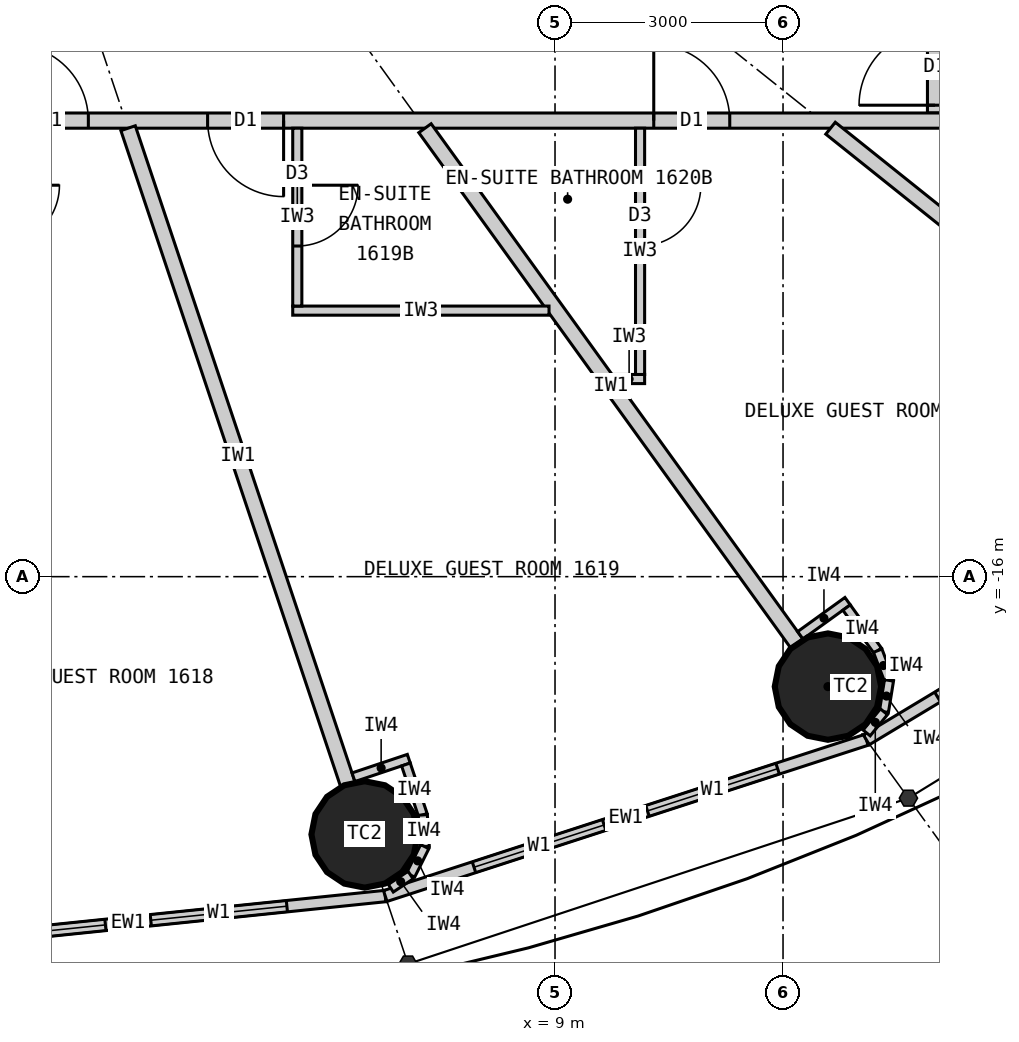
"""IFC4 building model, lengths in metres.
Left out: names, types, materials, properties, quantities, classifications, styles, units other than length and angle.
Written with IfcOpenShell. Run it as: python <this file> out.ifc"""

import sys

from ifc_helpers import new_model, si_unit, direction, frame, frame_2d, origin, origin_2d, place, context, subcontext, project, spatial, rectangle, circle, extrude, element, fill, save


model = new_model("IFC4")
c1 = context("Model", 3, precision=1e-05, world=origin(), true_north=direction((0.0, 1.0)))
c2 = subcontext(c1, "Body", "Model", "MODEL_VIEW")
j1 = project(units=[si_unit("LENGTHUNIT", "METRE"), si_unit("PLANEANGLEUNIT", "RADIAN")], contexts=[c1])
p1 = place(None, origin())
s1 = spatial("IfcSite", under=j1, at=p1, CompositionType="ELEMENT")
p2 = place(p1, origin())
s2 = spatial("IfcBuilding", under=s1, at=p2, CompositionType="ELEMENT")
p3 = place(p2, frame((0.0, 0.0, 67.2)))
s3 = spatial("IfcBuildingStorey", under=s2, at=p3, CompositionType="ELEMENT", Elevation=67.2)
for number, where, z_axis, x_axis in (
    (1, (6.495, -19.391, 0.0), (0.0, 0.0, 1.0), (1.0, 0.0, 0.0)),
    (2, (12.591, -17.447, 0.0), (0.0, 0.0, 1.0), (1.0, 0.0, 0.0)),
):
    element("IfcColumn", number, at=place(p3, frame(where, z_axis=z_axis, x_axis=x_axis)), inside=s3, PredefinedType="COLUMN", context=c2, shape_type="SweptSolid", body=[
        extrude(circle(Radius=0.7, at=origin_2d()), origin(), (0.0, 0.0, 1.0), 3.3),
    ])
p4 = place(p3, frame((0.0, -20.9, 0.0), z_axis=(0.0, 0.0, 1.0), x_axis=(0.994721394369, 0.102612609291, 0.0)))
e3 = element("IfcWall", 3, at=p4, inside=s3, PredefinedType="ELEMENTEDWALL", context=c2, shape_type="SweptSolid", body=[
    extrude(rectangle(XDim=6.802, YDim=0.15, at=frame_2d((3.401, 0.0))), origin(), (0.0, 0.0, 1.0), 3.12),
])
p5 = place(p4, frame((1.301, 0.0, 0.9)))
e4 = element("IfcOpeningElement", 4, at=p5, cuts=e3, PredefinedType="OPENING", context=c2, shape_type="SweptSolid", body=[
    extrude(rectangle(XDim=1.8, YDim=1.9, at=frame_2d((0.9, 0.95))), frame((0.0, 0.085, 0.0), z_axis=(0.0, -1.0, 0.0), x_axis=(1.0, 0.0, 0.0)), (0.0, 0.0, 1.0), 0.17),
])
p6 = place(p4, frame((3.701, 0.0, 0.9)))
e5 = element("IfcOpeningElement", 5, at=p6, cuts=e3, PredefinedType="OPENING", context=c2, shape_type="SweptSolid", body=[
    extrude(rectangle(XDim=1.8, YDim=1.9, at=frame_2d((0.9, 0.95))), frame((0.0, 0.085, 0.0), z_axis=(0.0, -1.0, 0.0), x_axis=(1.0, 0.0, 0.0)), (0.0, 0.0, 1.0), 0.17),
])
p7 = place(p3, frame((6.766, -20.202, 0.0), z_axis=(0.0, 0.0, 1.0), x_axis=(0.951137534625, 0.308767534285, 0.0)))
e6 = element("IfcWall", 6, at=p7, inside=s3, PredefinedType="ELEMENTEDWALL", context=c2, shape_type="SweptSolid", body=[
    extrude(rectangle(XDim=6.655, YDim=0.15, at=frame_2d((3.328, 0.0))), origin(), (0.0, 0.0, 1.0), 3.12),
])
p8 = place(p7, frame((1.228, 0.0, 0.9)))
e7 = element("IfcOpeningElement", 7, at=p8, cuts=e6, PredefinedType="OPENING", context=c2, shape_type="SweptSolid", body=[
    extrude(rectangle(XDim=1.8, YDim=1.9, at=frame_2d((0.9, 0.95))), frame((0.0, 0.085, 0.0), z_axis=(0.0, -1.0, 0.0), x_axis=(1.0, 0.0, 0.0)), (0.0, 0.0, 1.0), 0.17),
])
p9 = place(p7, frame((3.628, 0.0, 0.9)))
e8 = element("IfcOpeningElement", 8, at=p9, cuts=e6, PredefinedType="OPENING", context=c2, shape_type="SweptSolid", body=[
    extrude(rectangle(XDim=1.8, YDim=1.9, at=frame_2d((0.9, 0.95))), frame((0.0, 0.085, 0.0), z_axis=(0.0, -1.0, 0.0), x_axis=(1.0, 0.0, 0.0)), (0.0, 0.0, 1.0), 0.17),
])
p10 = place(p3, frame((13.096, -18.147, 0.0), z_axis=(0.0, 0.0, 1.0), x_axis=(0.856983180864, 0.515344377787, 0.0)))
e9 = element("IfcWall", 9, at=p10, inside=s3, PredefinedType="ELEMENTEDWALL", context=c2, shape_type="SweptSolid", body=[
    extrude(rectangle(XDim=6.386, YDim=0.15, at=frame_2d((3.193, 0.0))), origin(), (0.0, 0.0, 1.0), 3.12),
])
p11 = place(p10, frame((1.093, 0.0, 0.9)))
e10 = element("IfcOpeningElement", 10, at=p11, cuts=e9, PredefinedType="OPENING", context=c2, shape_type="SweptSolid", body=[
    extrude(rectangle(XDim=1.8, YDim=1.9, at=frame_2d((0.9, 0.95))), frame((0.0, 0.085, 0.0), z_axis=(0.0, -1.0, 0.0), x_axis=(1.0, 0.0, 0.0)), (0.0, 0.0, 1.0), 0.17),
])
p12 = place(p10, frame((3.493, 0.0, 0.9)))
e11 = element("IfcOpeningElement", 11, at=p12, cuts=e9, PredefinedType="OPENING", context=c2, shape_type="SweptSolid", body=[
    extrude(rectangle(XDim=1.8, YDim=1.9, at=frame_2d((0.9, 0.95))), frame((0.0, 0.085, 0.0), z_axis=(0.0, -1.0, 0.0), x_axis=(1.0, 0.0, 0.0)), (0.0, 0.0, 1.0), 0.17),
])
p13 = place(p3, frame((14.0, -9.9, 0.0), z_axis=(0.0, 0.0, 1.0), x_axis=(0.0, 1.0, 0.0)))
e12 = element("IfcWall", 12, at=p13, inside=s3, PredefinedType="PARTITIONING", context=c2, shape_type="SweptSolid", body=[
    extrude(rectangle(XDim=19.8, YDim=0.2, at=frame_2d((9.9, 0.0))), origin(), (0.0, 0.0, 1.0), 3.12),
])
p14 = place(p13, frame((0.103, 0.0, 0.0)))
e13 = element("IfcOpeningElement", 13, at=p14, cuts=e12, PredefinedType="OPENING", context=c2, shape_type="SweptSolid", body=[
    extrude(rectangle(XDim=1.0, YDim=2.2, at=frame_2d((0.5, 1.1))), frame((0.0, 0.11, 0.0), z_axis=(0.0, -1.0, 0.0), x_axis=(1.0, 0.0, 0.0)), (0.0, 0.0, 1.0), 0.22),
])
p15 = place(p13, frame((5.248, 0.0, 0.0)))
e14 = element("IfcOpeningElement", 14, at=p15, cuts=e12, PredefinedType="OPENING", context=c2, shape_type="SweptSolid", body=[
    extrude(rectangle(XDim=1.0, YDim=2.2, at=frame_2d((0.5, 1.1))), frame((0.0, 0.11, 0.0), z_axis=(0.0, -1.0, 0.0), x_axis=(1.0, 0.0, 0.0)), (0.0, 0.0, 1.0), 0.22),
])
p16 = place(p13, frame((8.438, 0.0, 0.0)))
e15 = element("IfcOpeningElement", 15, at=p16, cuts=e12, PredefinedType="OPENING", context=c2, shape_type="SweptSolid", body=[
    extrude(rectangle(XDim=1.0, YDim=2.2, at=frame_2d((0.5, 1.1))), frame((0.0, 0.11, 0.0), z_axis=(0.0, -1.0, 0.0), x_axis=(1.0, 0.0, 0.0)), (0.0, 0.0, 1.0), 0.22),
])
p17 = place(p13, frame((14.532, 0.0, 0.0)))
e16 = element("IfcOpeningElement", 16, at=p17, cuts=e12, PredefinedType="OPENING", context=c2, shape_type="SweptSolid", body=[
    extrude(rectangle(XDim=1.0, YDim=2.2, at=frame_2d((0.5, 1.1))), frame((0.0, 0.11, 0.0), z_axis=(0.0, -1.0, 0.0), x_axis=(1.0, 0.0, 0.0)), (0.0, 0.0, 1.0), 0.22),
])
p18 = place(p3, frame((14.1, -10.0, 0.0), z_axis=(0.0, 0.0, 1.0), x_axis=(-1.0, 0.0, 0.0)))
e17 = element("IfcWall", 17, at=p18, inside=s3, PredefinedType="PARTITIONING", context=c2, shape_type="SweptSolid", body=[
    extrude(rectangle(XDim=28.2, YDim=0.2, at=frame_2d((14.1, 0.0))), origin(), (0.0, 0.0, 1.0), 3.12),
])
p19 = place(p18, frame((23.865, 0.0, 0.0)))
e18 = element("IfcOpeningElement", 18, at=p19, cuts=e17, PredefinedType="OPENING", context=c2, shape_type="SweptSolid", body=[
    extrude(rectangle(XDim=1.0, YDim=2.2, at=frame_2d((0.5, 1.1))), frame((0.0, 0.11, 0.0), z_axis=(0.0, -1.0, 0.0), x_axis=(1.0, 0.0, 0.0)), (0.0, 0.0, 1.0), 0.22),
])
p20 = place(p18, frame((18.529, 0.0, 0.0)))
e19 = element("IfcOpeningElement", 19, at=p20, cuts=e17, PredefinedType="OPENING", context=c2, shape_type="SweptSolid", body=[
    extrude(rectangle(XDim=1.0, YDim=2.2, at=frame_2d((0.5, 1.1))), frame((0.0, 0.11, 0.0), z_axis=(0.0, -1.0, 0.0), x_axis=(1.0, 0.0, 0.0)), (0.0, 0.0, 1.0), 0.22),
])
p21 = place(p18, frame((14.623, 0.0, 0.0)))
e20 = element("IfcOpeningElement", 20, at=p21, cuts=e17, PredefinedType="OPENING", context=c2, shape_type="SweptSolid", body=[
    extrude(rectangle(XDim=1.0, YDim=2.2, at=frame_2d((0.5, 1.1))), frame((0.0, 0.11, 0.0), z_axis=(0.0, -1.0, 0.0), x_axis=(1.0, 0.0, 0.0)), (0.0, 0.0, 1.0), 0.22),
])
p22 = place(p18, frame((11.24, 0.0, 0.0)))
e21 = element("IfcOpeningElement", 21, at=p22, cuts=e17, PredefinedType="OPENING", context=c2, shape_type="SweptSolid", body=[
    extrude(rectangle(XDim=1.0, YDim=2.2, at=frame_2d((0.5, 1.1))), frame((0.0, 0.11, 0.0), z_axis=(0.0, -1.0, 0.0), x_axis=(1.0, 0.0, 0.0)), (0.0, 0.0, 1.0), 0.22),
])
p23 = place(p18, frame((8.671, 0.0, 0.0)))
e22 = element("IfcOpeningElement", 22, at=p23, cuts=e17, PredefinedType="OPENING", context=c2, shape_type="SweptSolid", body=[
    extrude(rectangle(XDim=1.0, YDim=2.2, at=frame_2d((0.5, 1.1))), frame((0.0, 0.11, 0.0), z_axis=(0.0, -1.0, 0.0), x_axis=(1.0, 0.0, 0.0)), (0.0, 0.0, 1.0), 0.22),
])
p24 = place(p18, frame((2.801, 0.0, 0.0)))
e23 = element("IfcOpeningElement", 23, at=p24, cuts=e17, PredefinedType="OPENING", context=c2, shape_type="SweptSolid", body=[
    extrude(rectangle(XDim=1.0, YDim=2.2, at=frame_2d((0.5, 1.1))), frame((0.0, 0.11, 0.0), z_axis=(0.0, -1.0, 0.0), x_axis=(1.0, 0.0, 0.0)), (0.0, 0.0, 1.0), 0.22),
])
p25 = place(p3, frame((3.383, -10.1, 0.0), z_axis=(0.0, 0.0, 1.0), x_axis=(0.31759592231, -0.948226149256, 0.0)))
e24 = element("IfcWall", 24, at=p25, inside=s3, PredefinedType="PARTITIONING", context=c2, shape_type="SweptSolid", body=[
    extrude(rectangle(XDim=9.098, YDim=0.2, at=frame_2d((4.549, 0.0))), origin(), (0.0, 0.0, 1.0), 2.32),
])
p26 = place(p3, frame((7.289, -10.1, 0.0), z_axis=(0.0, 0.0, 1.0), x_axis=(0.585198353053, -0.810890182197, 0.0)))
e25 = element("IfcWall", 25, at=p26, inside=s3, PredefinedType="PARTITIONING", context=c2, shape_type="SweptSolid", body=[
    extrude(rectangle(XDim=8.36, YDim=0.2, at=frame_2d((4.18, 0.0))), origin(), (0.0, 0.0, 1.0), 2.32),
])
p27 = place(p3, frame((12.625, -10.1, 0.0), z_axis=(0.0, 0.0, 1.0), x_axis=(0.780892451574, -0.624665493744, 0.0)))
e26 = element("IfcWall", 26, at=p27, inside=s3, PredefinedType="PARTITIONING", context=c2, shape_type="SweptSolid", body=[
    extrude(rectangle(XDim=6.045, YDim=0.2, at=frame_2d((3.022, 0.0))), origin(), (0.0, 0.0, 1.0), 2.32),
])
p28 = place(p3, frame((8.921, -12.5, 0.0), z_axis=(0.0, 0.0, 1.0), x_axis=(-1.0, 0.0, 0.0)))
e27 = element("IfcWall", 27, at=p28, inside=s3, PredefinedType="PARTITIONING", context=c2, shape_type="SweptSolid", body=[
    extrude(rectangle(XDim=3.372, YDim=0.12, at=frame_2d((1.686, 0.0))), origin(), (0.0, 0.0, 1.0), 3.12),
])
p29 = place(p3, frame((5.609, -10.1, 0.0), z_axis=(0.0, 0.0, 1.0), x_axis=(0.0, -1.0, 0.0)))
e28 = element("IfcWall", 28, at=p29, inside=s3, PredefinedType="PARTITIONING", context=c2, shape_type="SweptSolid", body=[
    extrude(rectangle(XDim=2.34, YDim=0.12, at=frame_2d((1.17, 0.0))), origin(), (0.0, 0.0, 1.0), 3.12),
])
p30 = place(p29, frame((0.75, 0.0, 0.0)))
e29 = element("IfcOpeningElement", 29, at=p30, cuts=e28, PredefinedType="OPENING", context=c2, shape_type="SweptSolid", body=[
    extrude(rectangle(XDim=0.8, YDim=2.1, at=frame_2d((0.4, 1.05))), frame((0.0, 0.07, 0.0), z_axis=(0.0, -1.0, 0.0), x_axis=(1.0, 0.0, 0.0)), (0.0, 0.0, 1.0), 0.14),
])
p31 = place(p3, frame((9.771, -13.4, 0.0), z_axis=(0.0, 0.0, 1.0), x_axis=(1.0, 0.0, 0.0)))
e30 = element("IfcWall", 30, at=p31, inside=s3, PredefinedType="PARTITIONING", context=c2, shape_type="SweptSolid", body=[
    extrude(rectangle(XDim=0.408, YDim=0.12, at=frame_2d((0.204, 0.0))), origin(), (0.0, 0.0, 1.0), 3.12),
])
p32 = place(p3, frame((10.119, -10.1, 0.0), z_axis=(0.0, 0.0, 1.0), x_axis=(0.0, -1.0, 0.0)))
e31 = element("IfcWall", 31, at=p32, inside=s3, PredefinedType="PARTITIONING", context=c2, shape_type="SweptSolid", body=[
    extrude(rectangle(XDim=3.24, YDim=0.12, at=frame_2d((1.62, 0.0))), origin(), (0.0, 0.0, 1.0), 3.12),
])
p33 = place(p32, frame((0.75, 0.0, 0.0)))
e32 = element("IfcOpeningElement", 32, at=p33, cuts=e31, PredefinedType="OPENING", context=c2, shape_type="SweptSolid", body=[
    extrude(rectangle(XDim=0.8, YDim=2.1, at=frame_2d((0.4, 1.05))), frame((0.0, 0.07, 0.0), z_axis=(0.0, -1.0, 0.0), x_axis=(1.0, 0.0, 0.0)), (0.0, 0.0, 1.0), 0.14),
])
p34 = place(p3, frame((6.348, -18.639, 0.0), z_axis=(0.0, 0.0, 1.0), x_axis=(0.948268951266, 0.317468102437, 0.0)))
e33 = element("IfcWall", 33, at=p34, inside=s3, PredefinedType="PARTITIONING", context=c2, shape_type="SweptSolid", body=[
    extrude(rectangle(XDim=0.768, YDim=0.12, at=frame_2d((0.384, 0.0))), origin(), (0.0, 0.0, 1.0), 3.12),
])
p35 = place(p3, frame((7.038, -18.471, 0.0), z_axis=(0.0, 0.0, 1.0), x_axis=(0.317378466199, -0.9482989556, 0.0)))
e34 = element("IfcWall", 34, at=p35, inside=s3, PredefinedType="PARTITIONING", context=c2, shape_type="SweptSolid", body=[
    extrude(rectangle(XDim=0.7, YDim=0.12, at=frame_2d((0.35, 0.0))), origin(), (0.0, 0.0, 1.0), 3.12),
])
p36 = place(p3, frame((7.26, -19.135, 0.0), z_axis=(0.0, 0.0, 1.0), x_axis=(0.0613238046, -0.99811792439, 0.0)))
e35 = element("IfcWall", 35, at=p36, inside=s3, PredefinedType="PARTITIONING", context=c2, shape_type="SweptSolid", body=[
    extrude(rectangle(XDim=0.418, YDim=0.12, at=frame_2d((0.209, 0.0))), origin(), (0.0, 0.0, 1.0), 3.12),
])
p37 = place(p3, frame((7.286, -19.552, 0.0), z_axis=(0.0, 0.0, 1.0), x_axis=(-0.445810757773, -0.89512723579, 0.0)))
e36 = element("IfcWall", 36, at=p37, inside=s3, PredefinedType="PARTITIONING", context=c2, shape_type="SweptSolid", body=[
    extrude(rectangle(XDim=0.418, YDim=0.12, at=frame_2d((0.209, 0.0))), origin(), (0.0, 0.0, 1.0), 3.12),
])
p38 = place(p3, frame((7.1, -19.926, 0.0), z_axis=(0.0, 0.0, 1.0), x_axis=(-0.833488262509, -0.552537162787, 0.0)))
e37 = element("IfcWall", 37, at=p38, inside=s3, PredefinedType="PARTITIONING", context=c2, shape_type="SweptSolid", body=[
    extrude(rectangle(XDim=0.313, YDim=0.12, at=frame_2d((0.156, 0.0))), origin(), (0.0, 0.0, 1.0), 3.12),
])
p39 = place(p3, frame((12.227, -16.772, 0.0), z_axis=(0.0, 0.0, 1.0), x_axis=(0.810821798253, 0.585293098778, 0.0)))
e38 = element("IfcWall", 38, at=p39, inside=s3, PredefinedType="PARTITIONING", context=c2, shape_type="SweptSolid", body=[
    extrude(rectangle(XDim=0.768, YDim=0.12, at=frame_2d((0.384, 0.0))), origin(), (0.0, 0.0, 1.0), 3.12),
])
p40 = place(p3, frame((12.836, -16.406, 0.0), z_axis=(0.0, 0.0, 1.0), x_axis=(0.585223113993, -0.810872312296, 0.0)))
e39 = element("IfcWall", 39, at=p40, inside=s3, PredefinedType="PARTITIONING", context=c2, shape_type="SweptSolid", body=[
    extrude(rectangle(XDim=0.7, YDim=0.12, at=frame_2d((0.35, 0.0))), origin(), (0.0, 0.0, 1.0), 3.12),
])
p41 = place(p3, frame((13.246, -16.974, 0.0), z_axis=(0.0, 0.0, 1.0), x_axis=(0.355728122235, -0.934589483705, 0.0)))
e40 = element("IfcWall", 40, at=p41, inside=s3, PredefinedType="PARTITIONING", context=c2, shape_type="SweptSolid", body=[
    extrude(rectangle(XDim=0.418, YDim=0.12, at=frame_2d((0.209, 0.0))), origin(), (0.0, 0.0, 1.0), 3.12),
])
p42 = place(p3, frame((13.394, -17.365, 0.0), z_axis=(0.0, 0.0, 1.0), x_axis=(-0.159379276926, -0.987217425943, 0.0)))
e41 = element("IfcWall", 41, at=p42, inside=s3, PredefinedType="PARTITIONING", context=c2, shape_type="SweptSolid", body=[
    extrude(rectangle(XDim=0.418, YDim=0.12, at=frame_2d((0.209, 0.0))), origin(), (0.0, 0.0, 1.0), 3.12),
])
p43 = place(p3, frame((13.328, -17.777, 0.0), z_axis=(0.0, 0.0, 1.0), x_axis=(-0.632276783541, -0.774742582407, 0.0)))
e42 = element("IfcWall", 42, at=p43, inside=s3, PredefinedType="PARTITIONING", context=c2, shape_type="SweptSolid", body=[
    extrude(rectangle(XDim=0.36, YDim=0.12, at=frame_2d((0.18, 0.0))), origin(), (0.0, 0.0, 1.0), 3.12),
])
p44 = place(p5, origin())
e43 = element("IfcWindow", 43, at=p44, inside=s3, PartitioningType="SINGLE_PANEL", PredefinedType="WINDOW", context=c2, shape_type="SweptSolid", body=[
    extrude(rectangle(XDim=1.8, YDim=1.9, at=frame_2d((0.9, 0.95))), frame((0.0, 0.03, 0.0), z_axis=(0.0, -1.0, 0.0), x_axis=(1.0, 0.0, 0.0)), (0.0, 0.0, 1.0), 0.06),
])
fill(e4, e43)
p45 = place(p6, origin())
e44 = element("IfcWindow", 44, at=p45, inside=s3, PartitioningType="SINGLE_PANEL", PredefinedType="WINDOW", context=c2, shape_type="SweptSolid", body=[
    extrude(rectangle(XDim=1.8, YDim=1.9, at=frame_2d((0.9, 0.95))), frame((0.0, 0.03, 0.0), z_axis=(0.0, -1.0, 0.0), x_axis=(1.0, 0.0, 0.0)), (0.0, 0.0, 1.0), 0.06),
])
fill(e5, e44)
p46 = place(p8, origin())
e45 = element("IfcWindow", 45, at=p46, inside=s3, PartitioningType="SINGLE_PANEL", PredefinedType="WINDOW", context=c2, shape_type="SweptSolid", body=[
    extrude(rectangle(XDim=1.8, YDim=1.9, at=frame_2d((0.9, 0.95))), frame((0.0, 0.03, 0.0), z_axis=(0.0, -1.0, 0.0), x_axis=(1.0, 0.0, 0.0)), (0.0, 0.0, 1.0), 0.06),
])
fill(e7, e45)
p47 = place(p9, origin())
e46 = element("IfcWindow", 46, at=p47, inside=s3, PartitioningType="SINGLE_PANEL", PredefinedType="WINDOW", context=c2, shape_type="SweptSolid", body=[
    extrude(rectangle(XDim=1.8, YDim=1.9, at=frame_2d((0.9, 0.95))), frame((0.0, 0.03, 0.0), z_axis=(0.0, -1.0, 0.0), x_axis=(1.0, 0.0, 0.0)), (0.0, 0.0, 1.0), 0.06),
])
fill(e8, e46)
p48 = place(p11, origin())
e47 = element("IfcWindow", 47, at=p48, inside=s3, PartitioningType="SINGLE_PANEL", PredefinedType="WINDOW", context=c2, shape_type="SweptSolid", body=[
    extrude(rectangle(XDim=1.8, YDim=1.9, at=frame_2d((0.9, 0.95))), frame((0.0, 0.03, 0.0), z_axis=(0.0, -1.0, 0.0), x_axis=(1.0, 0.0, 0.0)), (0.0, 0.0, 1.0), 0.06),
])
fill(e10, e47)
p49 = place(p14, origin())
e48 = element("IfcDoor", 48, at=p49, inside=s3, OperationType="SINGLE_SWING_LEFT", PredefinedType="DOOR", context=c2, shape_type="SweptSolid", body=[
    extrude(rectangle(XDim=1.0, YDim=2.2, at=frame_2d((0.5, 1.1))), frame((0.0, 0.025, 0.0), z_axis=(0.0, -1.0, 0.0), x_axis=(1.0, 0.0, 0.0)), (0.0, 0.0, 1.0), 0.05),
])
fill(e13, e48)
p50 = place(p22, origin())
e49 = element("IfcDoor", 49, at=p50, inside=s3, OperationType="SINGLE_SWING_RIGHT", PredefinedType="DOOR", context=c2, shape_type="SweptSolid", body=[
    extrude(rectangle(XDim=1.0, YDim=2.2, at=frame_2d((0.5, 1.1))), frame((0.0, 0.025, 0.0), z_axis=(0.0, -1.0, 0.0), x_axis=(1.0, 0.0, 0.0)), (0.0, 0.0, 1.0), 0.05),
])
fill(e21, e49)
p51 = place(p30, origin())
e50 = element("IfcDoor", 50, at=p51, inside=s3, OperationType="SINGLE_SWING_LEFT", PredefinedType="DOOR", context=c2, shape_type="SweptSolid", body=[
    extrude(rectangle(XDim=0.8, YDim=2.1, at=frame_2d((0.4, 1.05))), frame((0.0, 0.025, 0.0), z_axis=(0.0, -1.0, 0.0), x_axis=(1.0, 0.0, 0.0)), (0.0, 0.0, 1.0), 0.05),
])
fill(e29, e50)
p52 = place(p23, origin())
e51 = element("IfcDoor", 51, at=p52, inside=s3, OperationType="SINGLE_SWING_LEFT", PredefinedType="DOOR", context=c2, shape_type="SweptSolid", body=[
    extrude(rectangle(XDim=1.0, YDim=2.2, at=frame_2d((0.5, 1.1))), frame((0.0, 0.025, 0.0), z_axis=(0.0, -1.0, 0.0), x_axis=(1.0, 0.0, 0.0)), (0.0, 0.0, 1.0), 0.05),
])
fill(e22, e51)
p53 = place(p33, origin())
e52 = element("IfcDoor", 52, at=p53, inside=s3, OperationType="SINGLE_SWING_LEFT", PredefinedType="DOOR", context=c2, shape_type="SweptSolid", body=[
    extrude(rectangle(XDim=0.8, YDim=2.1, at=frame_2d((0.4, 1.05))), frame((0.0, 0.025, 0.0), z_axis=(0.0, -1.0, 0.0), x_axis=(1.0, 0.0, 0.0)), (0.0, 0.0, 1.0), 0.05),
])
fill(e32, e52)
p54 = place(p24, origin())
e53 = element("IfcDoor", 53, at=p54, inside=s3, OperationType="SINGLE_SWING_RIGHT", PredefinedType="DOOR", context=c2, shape_type="SweptSolid", body=[
    extrude(rectangle(XDim=1.0, YDim=2.2, at=frame_2d((0.5, 1.1))), frame((0.0, 0.025, 0.0), z_axis=(0.0, -1.0, 0.0), x_axis=(1.0, 0.0, 0.0)), (0.0, 0.0, 1.0), 0.05),
])
fill(e23, e53)
save(model, sys.argv[1])
